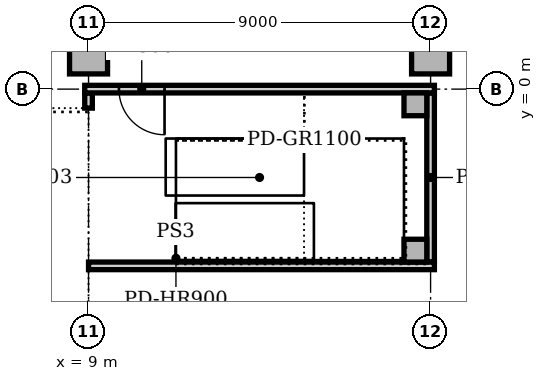
"""IFC4 building model, lengths in metres.
Left out: names, types, materials, properties, quantities, classifications, styles, units other than length and angle.
Written with IfcOpenShell. Run it as: python <this file> out.ifc"""

import sys

from ifc_helpers import new_model, si_unit, direction, frame, frame_2d, origin, origin_2d, place, context, subcontext, project, spatial, rectangle, extrude, element, fill, save


model = new_model("IFC4")
c1 = context("Model", 3, precision=1e-05, world=origin(), true_north=direction((0.0, 1.0)))
c2 = subcontext(c1, "Body", "Model", "MODEL_VIEW")
j1 = project(units=[si_unit("LENGTHUNIT", "METRE"), si_unit("PLANEANGLEUNIT", "RADIAN")], contexts=[c1])
p1 = place(None, origin())
s1 = spatial("IfcSite", under=j1, at=p1, CompositionType="ELEMENT")
p2 = place(p1, origin())
s2 = spatial("IfcBuilding", under=s1, at=p2, CompositionType="ELEMENT")
p3 = place(p2, frame((0.0, 0.0, -9.5)))
s3 = spatial("IfcBuildingStorey", under=s2, at=p3, CompositionType="ELEMENT", Elevation=-9.5)
for number, where, z_axis, x_axis in (
    (1, (9.0, 0.9, 0.0), (0.0, 0.0, 1.0), (1.0, 0.0, 0.0)),
    (2, (18.0, 0.9, 0.0), (0.0, 0.0, 1.0), (1.0, 0.0, 0.0)),
):
    element("IfcColumn", number, at=place(p3, frame(where, z_axis=z_axis, x_axis=x_axis)), inside=s3, PredefinedType="COLUMN", context=c2, shape_type="SweptSolid", body=[
        extrude(rectangle(XDim=1.0, YDim=1.0, at=origin_2d()), origin(), (0.0, 0.0, 1.0), 4.15),
    ])
for number, where, z_axis, x_axis in (
    (3, (17.6, -4.25, 0.0), (0.0, 0.0, 1.0), (1.0, 0.0, 0.0)),
    (4, (17.6, -0.4, 0.0), (0.0, 0.0, 1.0), (1.0, 0.0, 0.0)),
):
    element("IfcColumn", number, at=place(p3, frame(where, z_axis=z_axis, x_axis=x_axis)), inside=s3, PredefinedType="COLUMN", context=c2, shape_type="SweptSolid", body=[
        extrude(rectangle(XDim=0.6, YDim=0.6, at=origin_2d()), origin(), (0.0, 0.0, 1.0), 4.5),
    ])
p4 = place(p3, frame((18.0, -4.55, 0.0), z_axis=(0.0, 0.0, 1.0), x_axis=(0.0, 1.0, 0.0)))
e5 = element("IfcWall", 5, at=p4, inside=s3, PredefinedType="SOLIDWALL", context=c2, shape_type="SweptSolid", body=[
    extrude(rectangle(XDim=4.45, YDim=0.2, at=frame_2d((2.225, 0.0))), origin(), (0.0, 0.0, 1.0), 4.15),
])
p5 = place(p3, frame((9.0, -4.65, 0.0), z_axis=(0.0, 0.0, 1.0), x_axis=(1.0, 0.0, 0.0)))
e6 = element("IfcWall", 6, at=p5, inside=s3, PredefinedType="SOLIDWALL", context=c2, shape_type="SweptSolid", body=[
    extrude(rectangle(XDim=9.1, YDim=0.2, at=frame_2d((4.55, 0.0))), origin(), (0.0, 0.0, 1.0), 4.15),
])
p6 = place(p3, frame((9.0, -0.5, 0.0), z_axis=(0.0, 0.0, 1.0), x_axis=(0.0, 1.0, 0.0)))
e7 = element("IfcWall", 7, at=p6, inside=s3, PredefinedType="SOLIDWALL", context=c2, shape_type="SweptSolid", body=[
    extrude(rectangle(XDim=0.4, YDim=0.2, at=frame_2d((0.2, 0.0))), origin(), (0.0, 0.0, 1.0), 4.15),
])
p7 = place(p3, frame((8.9, 0.0, 0.0), z_axis=(0.0, 0.0, 1.0), x_axis=(1.0, 0.0, 0.0)))
e8 = element("IfcWall", 8, at=p7, inside=s3, PredefinedType="SOLIDWALL", context=c2, shape_type="SweptSolid", body=[
    extrude(rectangle(XDim=9.2, YDim=0.2, at=frame_2d((4.6, 0.0))), origin(), (0.0, 0.0, 1.0), 4.15),
])
p8 = place(p7, frame((0.9, 0.0, 0.0)))
e9 = element("IfcOpeningElement", 9, at=p8, cuts=e8, PredefinedType="OPENING", context=c2, shape_type="SweptSolid", body=[
    extrude(rectangle(XDim=1.2, YDim=2.1, at=frame_2d((0.6, 1.05))), frame((0.0, 0.11, 0.0), z_axis=(0.0, -1.0, 0.0), x_axis=(1.0, 0.0, 0.0)), (0.0, 0.0, 1.0), 0.22),
])
p9 = place(p8, frame((1.2, 0.0, 0.0), z_axis=(0.0, 0.0, 1.0), x_axis=(-1.0, 0.0, 0.0)))
e10 = element("IfcDoor", 10, at=p9, inside=s3, OperationType="SINGLE_SWING_LEFT", PredefinedType="DOOR", context=c2, shape_type="SweptSolid", body=[
    extrude(rectangle(XDim=1.2, YDim=2.1, at=frame_2d((0.6, 1.05))), frame((0.0, 0.025, 0.0), z_axis=(0.0, -1.0, 0.0), x_axis=(1.0, 0.0, 0.0)), (0.0, 0.0, 1.0), 0.05),
])
fill(e9, e10)
save(model, sys.argv[1])
